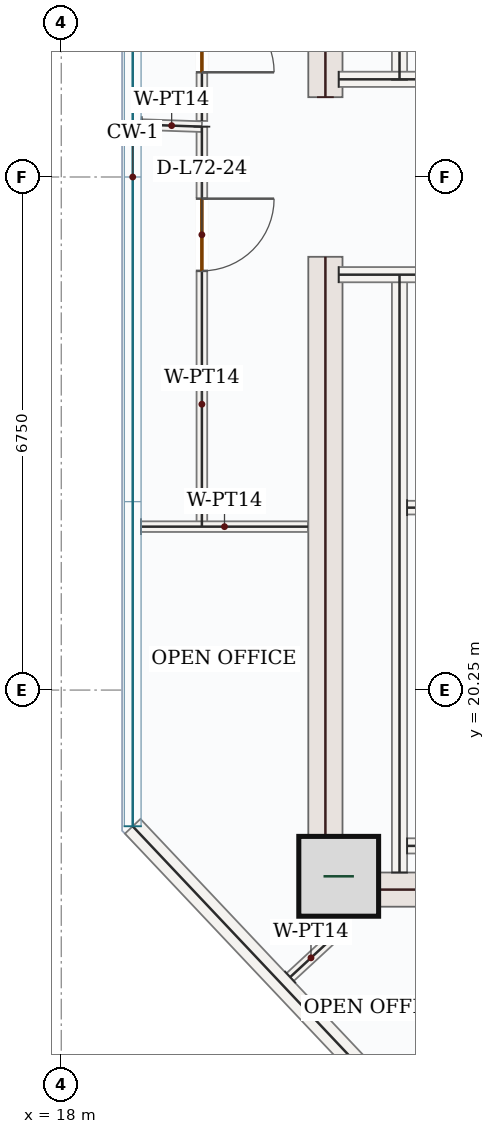
"""IFC4 building model, lengths in metres.
Left out: names, types, materials, properties, quantities, classifications, styles, units other than length and angle.
Written with IfcOpenShell. Run it as: python <this file> out.ifc"""

import sys

from ifc_helpers import new_model, si_unit, direction, frame, frame_2d, origin, origin_2d, place, context, subcontext, project, spatial, rectangle, extrude, source, transform, mapped, element, fill, save


model = new_model("IFC4")
c1 = context("Model", 3, precision=1e-05, world=origin(), true_north=direction((0.0, 1.0)))
c2 = subcontext(c1, "Body", "Model", "MODEL_VIEW")
j1 = project(units=[si_unit("LENGTHUNIT", "METRE"), si_unit("PLANEANGLEUNIT", "RADIAN")], contexts=[c1])
p1 = place(None, origin())
s1 = spatial("IfcSite", under=j1, at=p1, CompositionType="ELEMENT")
p2 = place(p1, origin())
s2 = spatial("IfcBuilding", under=s1, at=p2, CompositionType="ELEMENT")
p3 = place(p2, frame((0.0, 0.0, 299.1)))
s3 = spatial("IfcBuildingStorey", under=s2, at=p3, CompositionType="ELEMENT", Elevation=299.1)
m1 = source(origin(), c2, "Body", "SweptSolid", [
    extrude(rectangle(XDim=8.55, YDim=0.45, at=frame_2d((4.275, 0.0))), origin(), (0.0, 0.0, 1.0), 3.5),
])
for number, where, z_axis, x_axis in (
    (1, (21.475, 17.4, 0.0), (0.0, 0.0, 1.0), (0.0, 1.0, 0.0)),
    (2, (21.475, 28.05, 0.0), (0.0, 0.0, 1.0), (0.0, 1.0, 0.0)),
):
    element("IfcWall", number, at=place(p3, frame(where, z_axis=z_axis, x_axis=x_axis)), inside=s3, PredefinedType="SHEAR", context=c2, shape_type="MappedRepresentation", body=[
        mapped(m1, transform((0.0, 0.0, 0.0), x_axis=(1.0, 0.0, 0.0), y_axis=(0.0, 1.0, 0.0), z_axis=(0.0, 0.0, 1.0), scale=1.0)),
    ])
m2 = source(origin(), c2, "Body", "SweptSolid", [
    extrude(rectangle(XDim=7.1, YDim=0.45, at=frame_2d((3.55, 0.0))), origin(), (0.0, 0.0, 1.0), 3.5),
])
p4 = place(p3, frame((21.7, 17.625, 0.0), z_axis=(0.0, 0.0, 1.0), x_axis=(1.0, 0.0, 0.0)))
e3 = element("IfcWall", 3, at=p4, inside=s3, PredefinedType="SHEAR", context=c2, shape_type="MappedRepresentation", body=[
    mapped(m2, transform((0.0, 0.0, 0.0), x_axis=(1.0, 0.0, 0.0), y_axis=(0.0, 1.0, 0.0), z_axis=(0.0, 0.0, 1.0), scale=1.0)),
])
m3 = source(origin(), c2, "Body", "SweptSolid", [
    extrude(rectangle(XDim=1.05, YDim=1.05, at=origin_2d()), origin(), (0.0, 0.0, 1.0), 3.75),
])
p5 = place(p3, frame((21.65, 17.8, 0.0), z_axis=(0.0, 0.0, 1.0), x_axis=(1.0, 0.0, 0.0)))
e4 = element("IfcColumn", 4, at=p5, inside=s3, PredefinedType="COLUMN", context=c2, shape_type="MappedRepresentation", body=[
    mapped(m3, transform((0.0, 0.0, 0.0), x_axis=(1.0, 0.0, 0.0), y_axis=(0.0, 1.0, 0.0), z_axis=(0.0, 0.0, 1.0), scale=1.0)),
])
m4 = source(origin(), c2, "Body", "SweptSolid", [
    extrude(rectangle(XDim=10.274, YDim=0.28, at=frame_2d((5.137, 0.0))), origin(), (0.0, 0.0, 1.0), 3.5),
])
p6 = place(p3, frame((25.992, 10.987, 0.0), z_axis=(0.0, 0.0, 1.0), x_axis=(-0.68643580465, 0.727190405667, 0.0)))
e5 = element("IfcWall", 5, at=p6, inside=s3, PredefinedType="SOLIDWALL", context=c2, shape_type="MappedRepresentation", body=[
    mapped(m4, transform((0.0, 0.0, 0.0), x_axis=(1.0, 0.0, 0.0), y_axis=(0.0, 1.0, 0.0), z_axis=(0.0, 0.0, 1.0), scale=1.0)),
])
m5 = source(origin(), c2, "Body", "SweptSolid", [
    extrude(rectangle(XDim=7.87, YDim=0.2, at=frame_2d((3.935, 0.0))), origin(), (0.0, 0.0, 1.0), 3.5),
])
for number, where, z_axis, x_axis in (
    (6, (22.45, 17.85, 0.0), (0.0, 0.0, 1.0), (0.0, 1.0, 0.0)),
    (7, (22.45, 28.28, 0.0), (0.0, 0.0, 1.0), (0.0, 1.0, 0.0)),
):
    element("IfcWall", number, at=place(p3, frame(where, z_axis=z_axis, x_axis=x_axis)), inside=s3, PredefinedType="SOLIDWALL", context=c2, shape_type="MappedRepresentation", body=[
        mapped(m5, transform((0.0, 0.0, 0.0), x_axis=(1.0, 0.0, 0.0), y_axis=(0.0, 1.0, 0.0), z_axis=(0.0, 0.0, 1.0), scale=1.0)),
    ])
m6 = source(origin(), c2, "Body", "SweptSolid", [
    extrude(rectangle(XDim=4.25, YDim=0.2, at=frame_2d((2.125, 0.0))), origin(), (0.0, 0.0, 1.0), 3.5),
])
for number, where, z_axis, x_axis in (
    (8, (21.65, 25.715, 0.0), (0.0, 0.0, 1.0), (1.0, 0.0, 0.0)),
    (9, (21.65, 28.285, 0.0), (0.0, 0.0, 1.0), (1.0, 0.0, 0.0)),
):
    element("IfcWall", number, at=place(p3, frame(where, z_axis=z_axis, x_axis=x_axis)), inside=s3, PredefinedType="SOLIDWALL", context=c2, shape_type="MappedRepresentation", body=[
        mapped(m6, transform((0.0, 0.0, 0.0), x_axis=(1.0, 0.0, 0.0), y_axis=(0.0, 1.0, 0.0), z_axis=(0.0, 0.0, 1.0), scale=1.0)),
    ])
m7 = source(origin(), c2, "Body", "SweptSolid", [
    extrude(rectangle(XDim=3.25, YDim=0.2, at=frame_2d((1.625, 0.0))), origin(), (0.0, 0.0, 1.0), 3.5),
])
p7 = place(p3, frame((22.55, 18.2, 0.0), z_axis=(0.0, 0.0, 1.0), x_axis=(1.0, 0.0, 0.0)))
e10 = element("IfcWall", 10, at=p7, inside=s3, PredefinedType="SOLIDWALL", context=c2, shape_type="MappedRepresentation", body=[
    mapped(m7, transform((0.0, 0.0, 0.0), x_axis=(1.0, 0.0, 0.0), y_axis=(0.0, 1.0, 0.0), z_axis=(0.0, 0.0, 1.0), scale=1.0)),
])
m8 = source(origin(), c2, "Body", "SweptSolid", [
    extrude(rectangle(XDim=3.25, YDim=0.18, at=frame_2d((1.625, 0.0))), origin(), (0.0, 0.0, 1.0), 3.5),
])
p8 = place(p3, frame((22.55, 22.65, 0.0), z_axis=(0.0, 0.0, 1.0), x_axis=(1.0, 0.0, 0.0)))
e11 = element("IfcWall", 11, at=p8, inside=s3, PredefinedType="PARTITIONING", context=c2, shape_type="MappedRepresentation", body=[
    mapped(m8, transform((0.0, 0.0, 0.0), x_axis=(1.0, 0.0, 0.0), y_axis=(0.0, 1.0, 0.0), z_axis=(0.0, 0.0, 1.0), scale=1.0)),
])
m9 = source(origin(), c2, "Body", "SweptSolid", [
    extrude(rectangle(XDim=0.745, YDim=0.14, at=frame_2d((0.373, 0.0))), origin(), (0.0, 0.0, 1.0), 3.5),
])
p9 = place(p3, frame((21.012, 16.474, 0.0), z_axis=(0.0, 0.0, 1.0), x_axis=(0.734262819455, 0.678865312095, 0.0)))
e12 = element("IfcWall", 12, at=p9, inside=s3, PredefinedType="PARTITIONING", context=c2, shape_type="MappedRepresentation", body=[
    mapped(m9, transform((0.0, 0.0, 0.0), x_axis=(1.0, 0.0, 0.0), y_axis=(0.0, 1.0, 0.0), z_axis=(0.0, 0.0, 1.0), scale=1.0)),
])
p10 = place(p3, frame((19.85, 27.662, 0.0), z_axis=(0.0, 0.0, 1.0), x_axis=(0.0, -1.0, 0.0)))
e13 = element("IfcWall", 13, at=p10, inside=s3, PredefinedType="PARTITIONING", context=c2, shape_type="SweptSolid", body=[
    extrude(rectangle(XDim=5.256, YDim=0.14, at=frame_2d((2.628, 0.0))), origin(), (0.0, 0.0, 1.0), 3.5),
])
p11 = place(p10, frame((0.948, 0.0, 0.0)))
e14 = element("IfcOpeningElement", 14, at=p11, cuts=e13, PredefinedType="OPENING", context=c2, shape_type="SweptSolid", body=[
    extrude(rectangle(XDim=0.95, YDim=2.15, at=frame_2d((0.475, 1.075))), frame((0.0, 0.08, 0.0), z_axis=(0.0, -1.0, 0.0), x_axis=(1.0, 0.0, 0.0)), (0.0, 0.0, 1.0), 0.16),
])
m10 = source(origin(), c2, "Body", "SweptSolid", [
    extrude(rectangle(XDim=2.195, YDim=0.14, at=frame_2d((1.098, 0.0))), origin(), (0.0, 0.0, 1.0), 3.5),
])
p12 = place(p3, frame((19.05, 22.4, 0.0), z_axis=(0.0, 0.0, 1.0), x_axis=(1.0, 0.0, 0.0)))
e15 = element("IfcWall", 15, at=p12, inside=s3, PredefinedType="PARTITIONING", context=c2, shape_type="MappedRepresentation", body=[
    mapped(m10, transform((0.0, 0.0, 0.0), x_axis=(1.0, 0.0, 0.0), y_axis=(0.0, 1.0, 0.0), z_axis=(0.0, 0.0, 1.0), scale=1.0)),
])
m11 = source(origin(), c2, "Body", "SweptSolid", [
    extrude(rectangle(XDim=0.795, YDim=0.14, at=frame_2d((0.397, 0.0))), origin(), (0.0, 0.0, 1.0), 3.5),
])
p13 = place(p3, frame((19.055, 27.689, 0.0), z_axis=(0.0, 0.0, 1.0), x_axis=(0.999418697686, -0.034092033019, 0.0)))
e16 = element("IfcWall", 16, at=p13, inside=s3, PredefinedType="PARTITIONING", context=c2, shape_type="MappedRepresentation", body=[
    mapped(m11, transform((0.0, 0.0, 0.0), x_axis=(1.0, 0.0, 0.0), y_axis=(0.0, 1.0, 0.0), z_axis=(0.0, 0.0, 1.0), scale=1.0)),
])
p14 = place(p3, frame((19.851, 31.598, 0.0), z_axis=(0.0, 0.0, 1.0), x_axis=(-0.000316215517, -0.999999950004, 0.0)))
e17 = element("IfcWall", 17, at=p14, inside=s3, PredefinedType="PARTITIONING", context=c2, shape_type="SweptSolid", body=[
    extrude(rectangle(XDim=3.86, YDim=0.14, at=frame_2d((1.93, 0.0))), origin(), (0.0, 0.0, 1.0), 3.5),
])
p15 = place(p14, frame((2.27, 0.0, 0.0)))
e18 = element("IfcOpeningElement", 18, at=p15, cuts=e17, PredefinedType="OPENING", context=c2, shape_type="SweptSolid", body=[
    extrude(rectangle(XDim=0.95, YDim=2.15, at=frame_2d((0.475, 1.075))), frame((0.0, 0.08, 0.0), z_axis=(0.0, -1.0, 0.0), x_axis=(1.0, 0.0, 0.0)), (0.0, 0.0, 1.0), 0.16),
])
m12 = source(origin(), c2, "Body", "SweptSolid", [
    extrude(rectangle(XDim=0.95, YDim=2.15, at=frame_2d((0.475, 1.075))), frame((0.0, 0.025, 0.0), z_axis=(0.0, -1.0, 0.0), x_axis=(1.0, 0.0, 0.0)), (0.0, 0.0, 1.0), 0.05),
])
p16 = place(p15, origin())
e19 = element("IfcDoor", 19, at=p16, inside=s3, OperationType="SINGLE_SWING_RIGHT", PredefinedType="DOOR", context=c2, shape_type="MappedRepresentation", body=[
    mapped(m12, transform((0.0, 0.0, 0.0), x_axis=(1.0, 0.0, 0.0), y_axis=(0.0, 1.0, 0.0), z_axis=(0.0, 0.0, 1.0), scale=1.0)),
])
fill(e18, e19)
p17 = place(p11, origin())
e20 = element("IfcDoor", 20, at=p17, inside=s3, OperationType="SINGLE_SWING_LEFT", PredefinedType="DOOR", context=c2, shape_type="MappedRepresentation", body=[
    mapped(m12, transform((0.0, 0.0, 0.0), x_axis=(1.0, 0.0, 0.0), y_axis=(0.0, 1.0, 0.0), z_axis=(0.0, 0.0, 1.0), scale=1.0)),
])
fill(e14, e20)
save(model, sys.argv[1])
